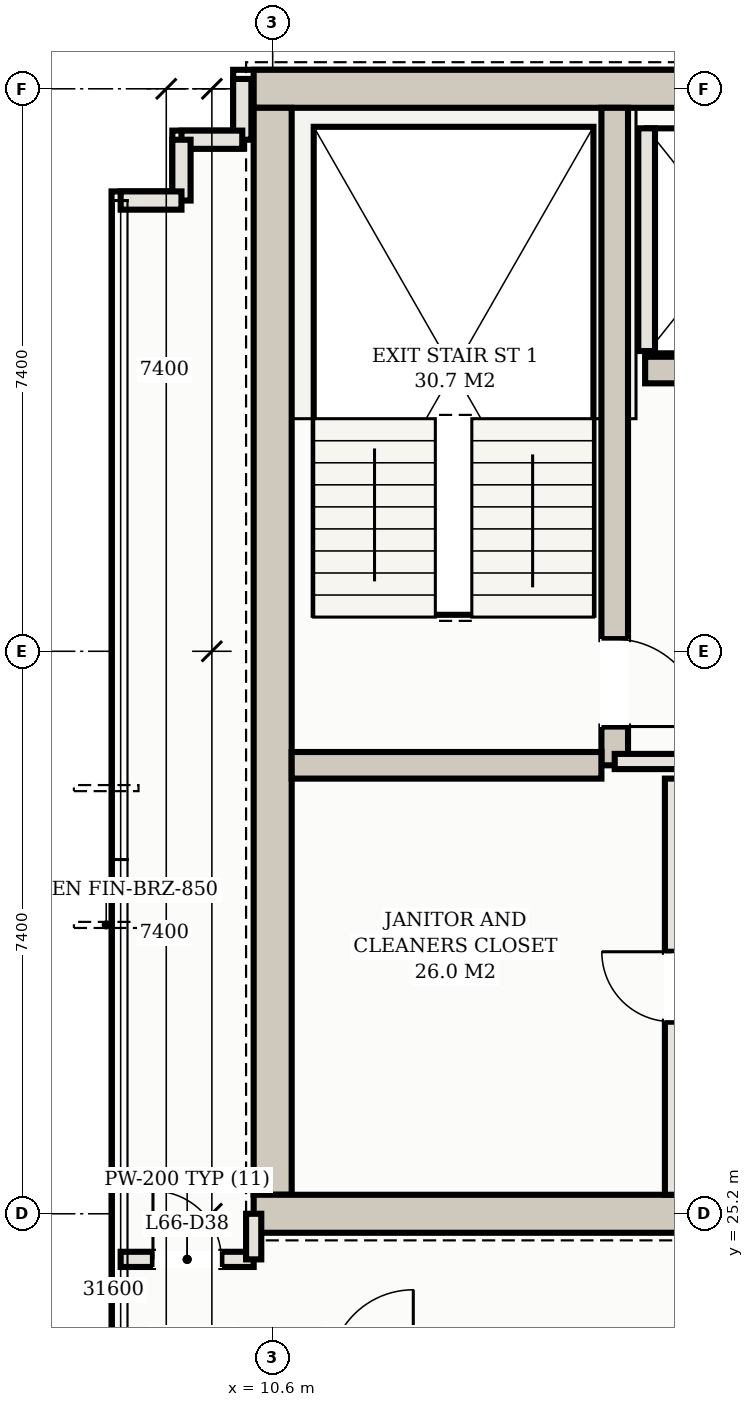
"""IFC4 building model, lengths in metres.
Left out: names, types, materials, properties, quantities, classifications, styles, units other than length and angle.
Written with IfcOpenShell. Run it as: python <this file> out.ifc"""

import sys

from ifc_helpers import new_model, si_unit, direction, frame, frame_2d, origin, place, context, subcontext, project, spatial, rectangle, extrude, element, fill, save


model = new_model("IFC4")
c1 = context("Model", 3, precision=1e-05, world=origin(), true_north=direction((0.0, 1.0)))
c2 = subcontext(c1, "Body", "Model", "MODEL_VIEW")
j1 = project(units=[si_unit("LENGTHUNIT", "METRE"), si_unit("PLANEANGLEUNIT", "RADIAN")], contexts=[c1])
p1 = place(None, origin())
s1 = spatial("IfcSite", under=j1, at=p1, CompositionType="ELEMENT")
p2 = place(p1, origin())
s2 = spatial("IfcBuilding", under=s1, at=p2, CompositionType="ELEMENT")
p3 = place(p2, frame((0.0, 0.0, 239.6)))
s3 = spatial("IfcBuildingStorey", under=s2, at=p3, CompositionType="ELEMENT", Elevation=239.6)
p4 = place(p3, frame((10.35, 40.0, 0.0), z_axis=(0.0, 0.0, 1.0), x_axis=(1.0, 0.0, 0.0)))
e1 = element("IfcWall", 1, at=p4, inside=s3, PredefinedType="SHEAR", context=c2, shape_type="SweptSolid", body=[
    extrude(rectangle(XDim=32.3, YDim=0.5, at=frame_2d((16.15, 0.0))), origin(), (0.0, 0.0, 1.0), 3.11),
])
p5 = place(p3, frame((10.6, 25.45, 0.0), z_axis=(0.0, 0.0, 1.0), x_axis=(0.0, 1.0, 0.0)))
e2 = element("IfcWall", 2, at=p5, inside=s3, PredefinedType="SHEAR", context=c2, shape_type="SweptSolid", body=[
    extrude(rectangle(XDim=14.3, YDim=0.5, at=frame_2d((7.15, 0.0))), origin(), (0.0, 0.0, 1.0), 3.11),
])
p6 = place(p3, frame((10.35, 25.2, 0.0), z_axis=(0.0, 0.0, 1.0), x_axis=(1.0, 0.0, 0.0)))
e3 = element("IfcWall", 3, at=p6, inside=s3, PredefinedType="SHEAR", context=c2, shape_type="SweptSolid", body=[
    extrude(rectangle(XDim=8.05, YDim=0.5, at=frame_2d((4.025, 0.0))), origin(), (0.0, 0.0, 1.0), 3.11),
])
p7 = place(p6, frame((6.15, 0.0, 0.0)))
e4 = element("IfcOpeningElement", 4, at=p7, cuts=e3, PredefinedType="OPENING", context=c2, shape_type="SweptSolid", body=[
    extrude(rectangle(XDim=1.25, YDim=2.2, at=frame_2d((0.625, 1.1))), frame((0.0, 0.26, 0.0), z_axis=(0.0, -1.0, 0.0), x_axis=(1.0, 0.0, 0.0)), (0.0, 0.0, 1.0), 0.52),
])
p8 = place(p3, frame((15.1, 31.1, 0.0), z_axis=(0.0, 0.0, 1.0), x_axis=(0.0, 1.0, 0.0)))
e5 = element("IfcWall", 5, at=p8, inside=s3, PredefinedType="SHEAR", context=c2, shape_type="SweptSolid", body=[
    extrude(rectangle(XDim=8.65, YDim=0.35, at=frame_2d((4.325, 0.0))), origin(), (0.0, 0.0, 1.0), 3.11),
])
p9 = place(p8, frame((0.51, 0.0, 0.0)))
e6 = element("IfcOpeningElement", 6, at=p9, cuts=e5, PredefinedType="OPENING", context=c2, shape_type="SweptSolid", body=[
    extrude(rectangle(XDim=1.15, YDim=2.2, at=frame_2d((0.575, 1.1))), frame((0.0, 0.185, 0.0), z_axis=(0.0, -1.0, 0.0), x_axis=(1.0, 0.0, 0.0)), (0.0, 0.0, 1.0), 0.37),
])
p10 = place(p3, frame((10.85, 31.1, 0.0), z_axis=(0.0, 0.0, 1.0), x_axis=(1.0, 0.0, 0.0)))
e7 = element("IfcWall", 7, at=p10, inside=s3, PredefinedType="SHEAR", context=c2, shape_type="SweptSolid", body=[
    extrude(rectangle(XDim=4.075, YDim=0.35, at=frame_2d((2.038, 0.0))), origin(), (0.0, 0.0, 1.0), 3.11),
])
p11 = place(p3, frame((15.5, 36.3, 0.0), z_axis=(0.0, 0.0, 1.0), x_axis=(1.0, 0.0, 0.0)))
e8 = element("IfcWall", 8, at=p11, inside=s3, PredefinedType="SHEAR", context=c2, shape_type="SweptSolid", body=[
    extrude(rectangle(XDim=22.0, YDim=0.35, at=frame_2d((11.0, 0.0))), origin(), (0.0, 0.0, 1.0), 3.11),
])
p12 = place(p11, frame((0.65, 0.0, 0.0)))
e9 = element("IfcOpeningElement", 9, at=p12, cuts=e8, PredefinedType="OPENING", context=c2, shape_type="SweptSolid", body=[
    extrude(rectangle(XDim=1.1, YDim=2.15, at=frame_2d((0.55, 1.075))), frame((0.0, 0.185, 0.0), z_axis=(0.0, -1.0, 0.0), x_axis=(1.0, 0.0, 0.0)), (0.0, 0.0, 1.0), 0.37),
])
p13 = place(p11, frame((20.25, 0.0, 0.0)))
e10 = element("IfcOpeningElement", 10, at=p13, cuts=e8, PredefinedType="OPENING", context=c2, shape_type="SweptSolid", body=[
    extrude(rectangle(XDim=1.1, YDim=2.15, at=frame_2d((0.55, 1.075))), frame((0.0, 0.185, 0.0), z_axis=(0.0, -1.0, 0.0), x_axis=(1.0, 0.0, 0.0)), (0.0, 0.0, 1.0), 0.37),
])
p14 = place(p11, frame((17.05, 0.0, 0.0)))
e11 = element("IfcOpeningElement", 11, at=p14, cuts=e8, PredefinedType="OPENING", context=c2, shape_type="SweptSolid", body=[
    extrude(rectangle(XDim=1.3, YDim=2.2, at=frame_2d((0.65, 1.1))), frame((0.0, 0.185, 0.0), z_axis=(0.0, -1.0, 0.0), x_axis=(1.0, 0.0, 0.0)), (0.0, 0.0, 1.0), 0.37),
])
p15 = place(p11, frame((3.95, 0.0, 0.0)))
e12 = element("IfcOpeningElement", 12, at=p15, cuts=e8, PredefinedType="OPENING", context=c2, shape_type="SweptSolid", body=[
    extrude(rectangle(XDim=1.1, YDim=2.15, at=frame_2d((0.55, 1.075))), frame((0.0, 0.185, 0.0), z_axis=(0.0, -1.0, 0.0), x_axis=(1.0, 0.0, 0.0)), (0.0, 0.0, 1.0), 0.37),
])
p16 = place(p11, frame((6.55, 0.0, 0.0)))
e13 = element("IfcOpeningElement", 13, at=p16, cuts=e8, PredefinedType="OPENING", context=c2, shape_type="SweptSolid", body=[
    extrude(rectangle(XDim=1.1, YDim=2.15, at=frame_2d((0.55, 1.075))), frame((0.0, 0.185, 0.0), z_axis=(0.0, -1.0, 0.0), x_axis=(1.0, 0.0, 0.0)), (0.0, 0.0, 1.0), 0.37),
])
p17 = place(p11, frame((9.15, 0.0, 0.0)))
e14 = element("IfcOpeningElement", 14, at=p17, cuts=e8, PredefinedType="OPENING", context=c2, shape_type="SweptSolid", body=[
    extrude(rectangle(XDim=1.1, YDim=2.15, at=frame_2d((0.55, 1.075))), frame((0.0, 0.185, 0.0), z_axis=(0.0, -1.0, 0.0), x_axis=(1.0, 0.0, 0.0)), (0.0, 0.0, 1.0), 0.37),
])
p18 = place(p3, frame((15.52, 36.55, 0.0), z_axis=(0.0, 0.0, 1.0), x_axis=(0.0, 1.0, 0.0)))
e15 = element("IfcWall", 15, at=p18, inside=s3, PredefinedType="SOLIDWALL", context=c2, shape_type="SweptSolid", body=[
    extrude(rectangle(XDim=2.93, YDim=0.22, at=frame_2d((1.465, 0.0))), origin(), (0.0, 0.0, 1.0), 3.11),
])
p19 = place(p3, frame((10.2, 40.13, 0.0), z_axis=(0.0, 0.0, 1.0), x_axis=(0.0, -1.0, 0.0)))
e16 = element("IfcWall", 16, at=p19, inside=s3, PredefinedType="SOLIDWALL", context=c2, shape_type="SweptSolid", body=[
    extrude(rectangle(XDim=0.8, YDim=0.24, at=frame_2d((0.4, 0.0))), origin(), (0.0, 0.0, 1.0), 3.11),
])
for number, where, z_axis, x_axis in (
    (17, (10.2, 39.33, 0.0), (0.0, 0.0, 1.0), (-1.0, 0.0, 0.0)),
    (18, (9.4, 39.33, 0.0), (0.0, 0.0, 1.0), (0.0, -1.0, 0.0)),
):
    element("IfcWall", number, at=place(p3, frame(where, z_axis=z_axis, x_axis=x_axis)), inside=s3, PredefinedType="SOLIDWALL", context=c2, shape_type="SweptSolid", body=[
        extrude(rectangle(XDim=0.8, YDim=0.24, at=frame_2d((0.4, 0.0))), origin(), (0.0, 0.0, 1.0), 3.11),
    ])
p20 = place(p3, frame((9.4, 38.53, 0.0), z_axis=(0.0, 0.0, 1.0), x_axis=(-1.0, 0.0, 0.0)))
e19 = element("IfcWall", 19, at=p20, inside=s3, PredefinedType="SOLIDWALL", context=c2, shape_type="SweptSolid", body=[
    extrude(rectangle(XDim=0.8, YDim=0.24, at=frame_2d((0.4, 0.0))), origin(), (0.0, 0.0, 1.0), 3.11),
])
p21 = place(p3, frame((15.1, 31.15, 0.0), z_axis=(0.0, 0.0, 1.0), x_axis=(1.0, 0.0, 0.0)))
e20 = element("IfcWall", 20, at=p21, inside=s3, PredefinedType="PARTITIONING", context=c2, shape_type="SweptSolid", body=[
    extrude(rectangle(XDim=3.25, YDim=0.2, at=frame_2d((1.625, 0.0))), origin(), (0.0, 0.0, 1.0), 2.45),
])
p22 = place(p21, frame((1.275, 0.0, 0.0)))
e21 = element("IfcOpeningElement", 21, at=p22, cuts=e20, PredefinedType="OPENING", context=c2, shape_type="SweptSolid", body=[
    extrude(rectangle(XDim=1.25, YDim=2.2, at=frame_2d((0.625, 1.1))), frame((0.0, 0.11, 0.0), z_axis=(0.0, -1.0, 0.0), x_axis=(1.0, 0.0, 0.0)), (0.0, 0.0, 1.0), 0.22),
])
p23 = place(p3, frame((15.85, 25.45, 0.0), z_axis=(0.0, 0.0, 1.0), x_axis=(0.0, 1.0, 0.0)))
e22 = element("IfcWall", 22, at=p23, inside=s3, PredefinedType="PARTITIONING", context=c2, shape_type="SweptSolid", body=[
    extrude(rectangle(XDim=5.475, YDim=0.18, at=frame_2d((2.738, 0.0))), origin(), (0.0, 0.0, 1.0), 2.45),
])
p24 = place(p23, frame((2.277, 0.0, 0.0)))
e23 = element("IfcOpeningElement", 23, at=p24, cuts=e22, PredefinedType="OPENING", context=c2, shape_type="SweptSolid", body=[
    extrude(rectangle(XDim=0.92, YDim=2.15, at=frame_2d((0.46, 1.075))), frame((0.0, 0.1, 0.0), z_axis=(0.0, -1.0, 0.0), x_axis=(1.0, 0.0, 0.0)), (0.0, 0.0, 1.0), 0.2),
])
p25 = place(p3, frame((8.6, 24.6, 0.0), z_axis=(0.0, 0.0, 1.0), x_axis=(1.0, 0.0, 0.0)))
e24 = element("IfcWall", 24, at=p25, inside=s3, PredefinedType="PARTITIONING", context=c2, shape_type="SweptSolid", body=[
    extrude(rectangle(XDim=1.75, YDim=0.2, at=frame_2d((0.875, 0.0))), origin(), (0.0, 0.0, 1.0), 2.45),
])
p26 = place(p25, frame((0.425, 0.0, 0.0)))
e25 = element("IfcOpeningElement", 25, at=p26, cuts=e24, PredefinedType="OPENING", context=c2, shape_type="SweptSolid", body=[
    extrude(rectangle(XDim=0.9, YDim=2.15, at=frame_2d((0.45, 1.075))), frame((0.0, 0.11, 0.0), z_axis=(0.0, -1.0, 0.0), x_axis=(1.0, 0.0, 0.0)), (0.0, 0.0, 1.0), 0.22),
])
p27 = place(p3, frame((10.35, 24.6, 0.0), z_axis=(0.0, 0.0, 1.0), x_axis=(0.0, 1.0, 0.0)))
e26 = element("IfcWall", 26, at=p27, inside=s3, PredefinedType="PARTITIONING", context=c2, shape_type="SweptSolid", body=[
    extrude(rectangle(XDim=0.6, YDim=0.2, at=frame_2d((0.3, 0.0))), origin(), (0.0, 0.0, 1.0), 2.45),
])
p28 = place(p9, frame((1.15, 0.0, 0.0), z_axis=(0.0, 0.0, 1.0), x_axis=(-1.0, 0.0, 0.0)))
e27 = element("IfcDoor", 27, at=p28, inside=s3, OperationType="SINGLE_SWING_RIGHT", PredefinedType="DOOR", context=c2, shape_type="SweptSolid", body=[
    extrude(rectangle(XDim=1.15, YDim=2.2, at=frame_2d((0.575, 1.1))), frame((0.0, 0.025, 0.0), z_axis=(0.0, -1.0, 0.0), x_axis=(1.0, 0.0, 0.0)), (0.0, 0.0, 1.0), 0.05),
])
fill(e6, e27)
p29 = place(p24, origin())
e28 = element("IfcDoor", 28, at=p29, inside=s3, OperationType="SINGLE_SWING_RIGHT", PredefinedType="DOOR", context=c2, shape_type="SweptSolid", body=[
    extrude(rectangle(XDim=0.92, YDim=2.15, at=frame_2d((0.46, 1.075))), frame((0.0, 0.025, 0.0), z_axis=(0.0, -1.0, 0.0), x_axis=(1.0, 0.0, 0.0)), (0.0, 0.0, 1.0), 0.05),
])
fill(e23, e28)
p30 = place(p26, origin())
e29 = element("IfcDoor", 29, at=p30, inside=s3, OperationType="SINGLE_SWING_LEFT", PredefinedType="DOOR", context=c2, shape_type="SweptSolid", body=[
    extrude(rectangle(XDim=0.9, YDim=2.15, at=frame_2d((0.45, 1.075))), frame((0.0, 0.025, 0.0), z_axis=(0.0, -1.0, 0.0), x_axis=(1.0, 0.0, 0.0)), (0.0, 0.0, 1.0), 0.05),
])
fill(e25, e29)
save(model, sys.argv[1])
